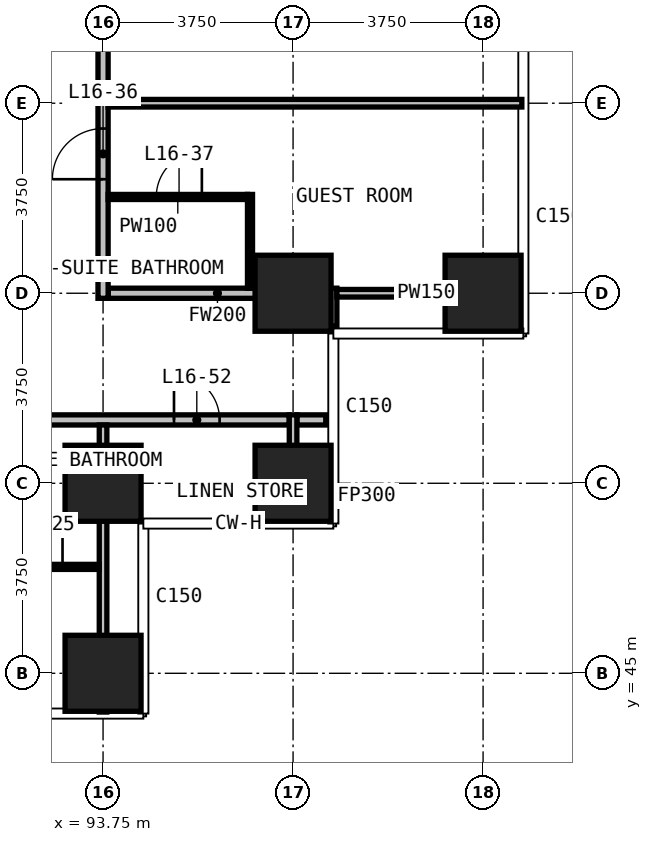
"""IFC4 building model, lengths in metres.
Left out: names, types, materials, properties, quantities, classifications, styles, units other than length and angle.
Written with IfcOpenShell. Run it as: python <this file> out.ifc"""

import sys

from ifc_helpers import new_model, si_unit, direction, frame, frame_2d, origin, origin_2d, place, context, subcontext, project, spatial, rectangle, extrude, element, fill, save


model = new_model("IFC4")
c1 = context("Model", 3, precision=1e-05, world=origin(), true_north=direction((0.0, 1.0)))
c2 = subcontext(c1, "Body", "Model", "MODEL_VIEW")
j1 = project(units=[si_unit("LENGTHUNIT", "METRE"), si_unit("PLANEANGLEUNIT", "RADIAN")], contexts=[c1])
p1 = place(None, origin())
s1 = spatial("IfcSite", under=j1, at=p1, CompositionType="ELEMENT")
p2 = place(p1, origin())
s2 = spatial("IfcBuilding", under=s1, at=p2, CompositionType="ELEMENT")
p3 = place(p2, frame((0.0, 0.0, 72.5)))
s3 = spatial("IfcBuildingStorey", under=s2, at=p3, CompositionType="ELEMENT", Elevation=72.5)
for number, where, z_axis, x_axis in (
    (1, (93.75, 45.0, 0.0), (0.0, 0.0, 1.0), (1.0, 0.0, 0.0)),
    (2, (93.75, 48.75, 0.0), (0.0, 0.0, 1.0), (1.0, 0.0, 0.0)),
    (3, (97.5, 48.75, 0.0), (0.0, 0.0, 1.0), (1.0, 0.0, 0.0)),
    (4, (97.5, 52.5, 0.0), (0.0, 0.0, 1.0), (1.0, 0.0, 0.0)),
    (5, (101.25, 52.5, 0.0), (0.0, 0.0, 1.0), (1.0, 0.0, 0.0)),
):
    element("IfcColumn", number, at=place(p3, frame(where, z_axis=z_axis, x_axis=x_axis)), inside=s3, PredefinedType="COLUMN", context=c2, shape_type="SweptSolid", body=[
        extrude(rectangle(XDim=1.5, YDim=1.5, at=origin_2d()), origin(), (0.0, 0.0, 1.0), 3.3),
    ])
p4 = place(p3, frame((52.575, 50.0, 0.0), z_axis=(0.0, 0.0, 1.0), x_axis=(1.0, 0.0, 0.0)))
e6 = element("IfcWall", 6, at=p4, inside=s3, PredefinedType="PARTITIONING", context=c2, shape_type="SweptSolid", body=[
    extrude(rectangle(XDim=44.85, YDim=0.2, at=frame_2d((22.425, 0.0))), origin(), (0.0, 0.0, 1.0), 3.0),
])
p5 = place(p4, frame((5.925, 0.0, 0.0)))
e7 = element("IfcOpeningElement", 7, at=p5, cuts=e6, PredefinedType="OPENING", context=c2, shape_type="SweptSolid", body=[
    extrude(rectangle(XDim=1.0, YDim=2.2, at=frame_2d((0.5, 1.1))), frame((0.0, 0.11, 0.0), z_axis=(0.0, -1.0, 0.0), x_axis=(1.0, 0.0, 0.0)), (0.0, 0.0, 1.0), 0.22),
])
p6 = place(p4, frame((7.925, 0.0, 0.0)))
e8 = element("IfcOpeningElement", 8, at=p6, cuts=e6, PredefinedType="OPENING", context=c2, shape_type="SweptSolid", body=[
    extrude(rectangle(XDim=1.0, YDim=2.2, at=frame_2d((0.5, 1.1))), frame((0.0, 0.11, 0.0), z_axis=(0.0, -1.0, 0.0), x_axis=(1.0, 0.0, 0.0)), (0.0, 0.0, 1.0), 0.22),
])
p7 = place(p4, frame((13.425, 0.0, 0.0)))
e9 = element("IfcOpeningElement", 9, at=p7, cuts=e6, PredefinedType="OPENING", context=c2, shape_type="SweptSolid", body=[
    extrude(rectangle(XDim=1.0, YDim=2.2, at=frame_2d((0.5, 1.1))), frame((0.0, 0.11, 0.0), z_axis=(0.0, -1.0, 0.0), x_axis=(1.0, 0.0, 0.0)), (0.0, 0.0, 1.0), 0.22),
])
p8 = place(p4, frame((15.425, 0.0, 0.0)))
e10 = element("IfcOpeningElement", 10, at=p8, cuts=e6, PredefinedType="OPENING", context=c2, shape_type="SweptSolid", body=[
    extrude(rectangle(XDim=1.0, YDim=2.2, at=frame_2d((0.5, 1.1))), frame((0.0, 0.11, 0.0), z_axis=(0.0, -1.0, 0.0), x_axis=(1.0, 0.0, 0.0)), (0.0, 0.0, 1.0), 0.22),
])
p9 = place(p4, frame((20.925, 0.0, 0.0)))
e11 = element("IfcOpeningElement", 11, at=p9, cuts=e6, PredefinedType="OPENING", context=c2, shape_type="SweptSolid", body=[
    extrude(rectangle(XDim=1.0, YDim=2.2, at=frame_2d((0.5, 1.1))), frame((0.0, 0.11, 0.0), z_axis=(0.0, -1.0, 0.0), x_axis=(1.0, 0.0, 0.0)), (0.0, 0.0, 1.0), 0.22),
])
p10 = place(p4, frame((22.925, 0.0, 0.0)))
e12 = element("IfcOpeningElement", 12, at=p10, cuts=e6, PredefinedType="OPENING", context=c2, shape_type="SweptSolid", body=[
    extrude(rectangle(XDim=1.0, YDim=2.2, at=frame_2d((0.5, 1.1))), frame((0.0, 0.11, 0.0), z_axis=(0.0, -1.0, 0.0), x_axis=(1.0, 0.0, 0.0)), (0.0, 0.0, 1.0), 0.22),
])
p11 = place(p4, frame((28.425, 0.0, 0.0)))
e13 = element("IfcOpeningElement", 13, at=p11, cuts=e6, PredefinedType="OPENING", context=c2, shape_type="SweptSolid", body=[
    extrude(rectangle(XDim=1.0, YDim=2.2, at=frame_2d((0.5, 1.1))), frame((0.0, 0.11, 0.0), z_axis=(0.0, -1.0, 0.0), x_axis=(1.0, 0.0, 0.0)), (0.0, 0.0, 1.0), 0.22),
])
p12 = place(p4, frame((30.425, 0.0, 0.0)))
e14 = element("IfcOpeningElement", 14, at=p12, cuts=e6, PredefinedType="OPENING", context=c2, shape_type="SweptSolid", body=[
    extrude(rectangle(XDim=1.0, YDim=2.2, at=frame_2d((0.5, 1.1))), frame((0.0, 0.11, 0.0), z_axis=(0.0, -1.0, 0.0), x_axis=(1.0, 0.0, 0.0)), (0.0, 0.0, 1.0), 0.22),
])
p13 = place(p4, frame((35.925, 0.0, 0.0)))
e15 = element("IfcOpeningElement", 15, at=p13, cuts=e6, PredefinedType="OPENING", context=c2, shape_type="SweptSolid", body=[
    extrude(rectangle(XDim=1.0, YDim=2.2, at=frame_2d((0.5, 1.1))), frame((0.0, 0.11, 0.0), z_axis=(0.0, -1.0, 0.0), x_axis=(1.0, 0.0, 0.0)), (0.0, 0.0, 1.0), 0.22),
])
p14 = place(p4, frame((37.925, 0.0, 0.0)))
e16 = element("IfcOpeningElement", 16, at=p14, cuts=e6, PredefinedType="OPENING", context=c2, shape_type="SweptSolid", body=[
    extrude(rectangle(XDim=1.0, YDim=2.2, at=frame_2d((0.5, 1.1))), frame((0.0, 0.11, 0.0), z_axis=(0.0, -1.0, 0.0), x_axis=(1.0, 0.0, 0.0)), (0.0, 0.0, 1.0), 0.22),
])
p15 = place(p4, frame((1.4, 0.0, 0.0)))
e17 = element("IfcOpeningElement", 17, at=p15, cuts=e6, PredefinedType="OPENING", context=c2, shape_type="SweptSolid", body=[
    extrude(rectangle(XDim=0.9, YDim=2.2, at=frame_2d((0.45, 1.1))), frame((0.0, 0.11, 0.0), z_axis=(0.0, -1.0, 0.0), x_axis=(1.0, 0.0, 0.0)), (0.0, 0.0, 1.0), 0.22),
])
p16 = place(p4, frame((42.575, 0.0, 0.0)))
e18 = element("IfcOpeningElement", 18, at=p16, cuts=e6, PredefinedType="OPENING", context=c2, shape_type="SweptSolid", body=[
    extrude(rectangle(XDim=0.9, YDim=2.2, at=frame_2d((0.45, 1.1))), frame((0.0, 0.11, 0.0), z_axis=(0.0, -1.0, 0.0), x_axis=(1.0, 0.0, 0.0)), (0.0, 0.0, 1.0), 0.22),
])
p17 = place(p3, frame((97.575, 50.0, 0.0), z_axis=(0.0, 0.0, 1.0), x_axis=(1.0, 0.0, 0.0)))
e19 = element("IfcWall", 19, at=p17, inside=s3, PredefinedType="PARTITIONING", context=c2, shape_type="SweptSolid", body=[
    extrude(rectangle(XDim=0.57, YDim=0.2, at=frame_2d((0.285, 0.0))), origin(), (0.0, 0.0, 1.0), 3.0),
])
p18 = place(p3, frame((93.85, 52.5, 0.0), z_axis=(0.0, 0.0, 1.0), x_axis=(1.0, 0.0, 0.0)))
e20 = element("IfcWall", 20, at=p18, inside=s3, PredefinedType="PARTITIONING", context=c2, shape_type="SweptSolid", body=[
    extrude(rectangle(XDim=4.315, YDim=0.2, at=frame_2d((2.157, 0.0))), origin(), (0.0, 0.0, 1.0), 3.0),
])
p19 = place(p3, frame((93.75, 52.4, 0.0), z_axis=(0.0, 0.0, 1.0), x_axis=(0.0, 1.0, 0.0)))
e21 = element("IfcWall", 21, at=p19, inside=s3, PredefinedType="PARTITIONING", context=c2, shape_type="SweptSolid", body=[
    extrude(rectangle(XDim=38.31, YDim=0.2, at=frame_2d((19.155, 0.0))), origin(), (0.0, 0.0, 1.0), 3.0),
])
p20 = place(p19, frame((2.35, 0.0, 0.0)))
e22 = element("IfcOpeningElement", 22, at=p20, cuts=e21, PredefinedType="OPENING", context=c2, shape_type="SweptSolid", body=[
    extrude(rectangle(XDim=1.0, YDim=2.2, at=frame_2d((0.5, 1.1))), frame((0.0, 0.11, 0.0), z_axis=(0.0, -1.0, 0.0), x_axis=(1.0, 0.0, 0.0)), (0.0, 0.0, 1.0), 0.22),
])
p21 = place(p19, frame((4.95, 0.0, 0.0)))
e23 = element("IfcOpeningElement", 23, at=p21, cuts=e21, PredefinedType="OPENING", context=c2, shape_type="SweptSolid", body=[
    extrude(rectangle(XDim=1.0, YDim=2.2, at=frame_2d((0.5, 1.1))), frame((0.0, 0.11, 0.0), z_axis=(0.0, -1.0, 0.0), x_axis=(1.0, 0.0, 0.0)), (0.0, 0.0, 1.0), 0.22),
])
p22 = place(p19, frame((16.75, 0.0, 0.0)))
e24 = element("IfcOpeningElement", 24, at=p22, cuts=e21, PredefinedType="OPENING", context=c2, shape_type="SweptSolid", body=[
    extrude(rectangle(XDim=1.0, YDim=2.2, at=frame_2d((0.5, 1.1))), frame((0.0, 0.11, 0.0), z_axis=(0.0, -1.0, 0.0), x_axis=(1.0, 0.0, 0.0)), (0.0, 0.0, 1.0), 0.22),
])
p23 = place(p19, frame((19.95, 0.0, 0.0)))
e25 = element("IfcOpeningElement", 25, at=p23, cuts=e21, PredefinedType="OPENING", context=c2, shape_type="SweptSolid", body=[
    extrude(rectangle(XDim=1.0, YDim=2.2, at=frame_2d((0.5, 1.1))), frame((0.0, 0.11, 0.0), z_axis=(0.0, -1.0, 0.0), x_axis=(1.0, 0.0, 0.0)), (0.0, 0.0, 1.0), 0.22),
])
p24 = place(p19, frame((31.75, 0.0, 0.0)))
e26 = element("IfcOpeningElement", 26, at=p24, cuts=e21, PredefinedType="OPENING", context=c2, shape_type="SweptSolid", body=[
    extrude(rectangle(XDim=1.0, YDim=2.2, at=frame_2d((0.5, 1.1))), frame((0.0, 0.11, 0.0), z_axis=(0.0, -1.0, 0.0), x_axis=(1.0, 0.0, 0.0)), (0.0, 0.0, 1.0), 0.22),
])
p25 = place(p19, frame((35.65, 0.0, 0.0)))
e27 = element("IfcOpeningElement", 27, at=p25, cuts=e21, PredefinedType="OPENING", context=c2, shape_type="SweptSolid", body=[
    extrude(rectangle(XDim=0.9, YDim=2.2, at=frame_2d((0.45, 1.1))), frame((0.0, 0.11, 0.0), z_axis=(0.0, -1.0, 0.0), x_axis=(1.0, 0.0, 0.0)), (0.0, 0.0, 1.0), 0.22),
])
p26 = place(p3, frame((98.265, 51.855, 0.0), z_axis=(0.0, 0.0, 1.0), x_axis=(0.0, 1.0, 0.0)))
e28 = element("IfcWall", 28, at=p26, inside=s3, PredefinedType="PARTITIONING", context=c2, shape_type="SweptSolid", body=[
    extrude(rectangle(XDim=0.745, YDim=0.2, at=frame_2d((0.373, 0.0))), origin(), (0.0, 0.0, 1.0), 3.0),
])
p27 = place(p3, frame((98.365, 52.5, 0.0), z_axis=(0.0, 0.0, 1.0), x_axis=(1.0, 0.0, 0.0)))
e29 = element("IfcWall", 29, at=p27, inside=s3, PredefinedType="PARTITIONING", context=c2, shape_type="SweptSolid", body=[
    extrude(rectangle(XDim=3.53, YDim=0.15, at=frame_2d((1.765, 0.0))), origin(), (0.0, 0.0, 1.0), 3.0),
])
p28 = place(p3, frame((93.85, 56.25, 0.0), z_axis=(0.0, 0.0, 1.0), x_axis=(1.0, 0.0, 0.0)))
e30 = element("IfcWall", 30, at=p28, inside=s3, PredefinedType="PARTITIONING", context=c2, shape_type="SweptSolid", body=[
    extrude(rectangle(XDim=8.165, YDim=0.15, at=frame_2d((4.083, 0.0))), origin(), (0.0, 0.0, 1.0), 3.0),
])
p29 = place(p3, frame((93.75, 44.235, 0.0), z_axis=(0.0, 0.0, 1.0), x_axis=(0.0, 1.0, 0.0)))
e31 = element("IfcWall", 31, at=p29, inside=s3, PredefinedType="PARTITIONING", context=c2, shape_type="SweptSolid", body=[
    extrude(rectangle(XDim=5.665, YDim=0.15, at=frame_2d((2.833, 0.0))), origin(), (0.0, 0.0, 1.0), 3.0),
])
p30 = place(p3, frame((97.5, 48.105, 0.0), z_axis=(0.0, 0.0, 1.0), x_axis=(0.0, 1.0, 0.0)))
e32 = element("IfcWall", 32, at=p30, inside=s3, PredefinedType="PARTITIONING", context=c2, shape_type="SweptSolid", body=[
    extrude(rectangle(XDim=1.995, YDim=0.15, at=frame_2d((0.998, 0.0))), origin(), (0.0, 0.0, 1.0), 3.0),
])
p31 = place(p3, frame((91.9, 47.1, 0.0), z_axis=(0.0, 0.0, 1.0), x_axis=(1.0, 0.0, 0.0)))
e33 = element("IfcWall", 33, at=p31, inside=s3, PredefinedType="PARTITIONING", context=c2, shape_type="SweptSolid", body=[
    extrude(rectangle(XDim=1.775, YDim=0.1, at=frame_2d((0.888, 0.0))), origin(), (0.0, 0.0, 1.0), 3.0),
])
p32 = place(p31, frame((0.15, 0.0, 0.0)))
e34 = element("IfcOpeningElement", 34, at=p32, cuts=e33, PredefinedType="OPENING", context=c2, shape_type="SweptSolid", body=[
    extrude(rectangle(XDim=0.9, YDim=2.2, at=frame_2d((0.45, 1.1))), frame((0.0, 0.06, 0.0), z_axis=(0.0, -1.0, 0.0), x_axis=(1.0, 0.0, 0.0)), (0.0, 0.0, 1.0), 0.12),
])
p33 = place(p3, frame((93.85, 54.4, 0.0), z_axis=(0.0, 0.0, 1.0), x_axis=(1.0, 0.0, 0.0)))
e35 = element("IfcWall", 35, at=p33, inside=s3, PredefinedType="PARTITIONING", context=c2, shape_type="SweptSolid", body=[
    extrude(rectangle(XDim=2.75, YDim=0.1, at=frame_2d((1.375, 0.0))), origin(), (0.0, 0.0, 1.0), 3.0),
])
p34 = place(p33, frame((0.95, 0.0, 0.0)))
e36 = element("IfcOpeningElement", 36, at=p34, cuts=e35, PredefinedType="OPENING", context=c2, shape_type="SweptSolid", body=[
    extrude(rectangle(XDim=0.9, YDim=2.2, at=frame_2d((0.45, 1.1))), frame((0.0, 0.06, 0.0), z_axis=(0.0, -1.0, 0.0), x_axis=(1.0, 0.0, 0.0)), (0.0, 0.0, 1.0), 0.12),
])
p35 = place(p3, frame((96.65, 52.6, 0.0), z_axis=(0.0, 0.0, 1.0), x_axis=(0.0, 1.0, 0.0)))
e37 = element("IfcWall", 37, at=p35, inside=s3, PredefinedType="PARTITIONING", context=c2, shape_type="SweptSolid", body=[
    extrude(rectangle(XDim=1.85, YDim=0.1, at=frame_2d((0.925, 0.0))), origin(), (0.0, 0.0, 1.0), 3.0),
])
p36 = place(p32, origin())
e38 = element("IfcDoor", 38, at=p36, inside=s3, OperationType="SINGLE_SWING_RIGHT", PredefinedType="DOOR", context=c2, shape_type="SweptSolid", body=[
    extrude(rectangle(XDim=0.9, YDim=2.2, at=frame_2d((0.45, 1.1))), frame((0.0, 0.025, 0.0), z_axis=(0.0, -1.0, 0.0), x_axis=(1.0, 0.0, 0.0)), (0.0, 0.0, 1.0), 0.05),
])
fill(e34, e38)
p37 = place(p20, origin())
e39 = element("IfcDoor", 39, at=p37, inside=s3, OperationType="SINGLE_SWING_LEFT", PredefinedType="DOOR", context=c2, shape_type="SweptSolid", body=[
    extrude(rectangle(XDim=1.0, YDim=2.2, at=frame_2d((0.5, 1.1))), frame((0.0, 0.025, 0.0), z_axis=(0.0, -1.0, 0.0), x_axis=(1.0, 0.0, 0.0)), (0.0, 0.0, 1.0), 0.05),
])
fill(e22, e39)
p38 = place(p34, origin())
e40 = element("IfcDoor", 40, at=p38, inside=s3, OperationType="SINGLE_SWING_RIGHT", PredefinedType="DOOR", context=c2, shape_type="SweptSolid", body=[
    extrude(rectangle(XDim=0.9, YDim=2.2, at=frame_2d((0.45, 1.1))), frame((0.0, 0.025, 0.0), z_axis=(0.0, -1.0, 0.0), x_axis=(1.0, 0.0, 0.0)), (0.0, 0.0, 1.0), 0.05),
])
fill(e36, e40)
p39 = place(p16, origin())
e41 = element("IfcDoor", 41, at=p39, inside=s3, OperationType="SINGLE_SWING_RIGHT", PredefinedType="DOOR", context=c2, shape_type="SweptSolid", body=[
    extrude(rectangle(XDim=0.9, YDim=2.2, at=frame_2d((0.45, 1.1))), frame((0.0, 0.025, 0.0), z_axis=(0.0, -1.0, 0.0), x_axis=(1.0, 0.0, 0.0)), (0.0, 0.0, 1.0), 0.05),
])
fill(e18, e41)
save(model, sys.argv[1])
